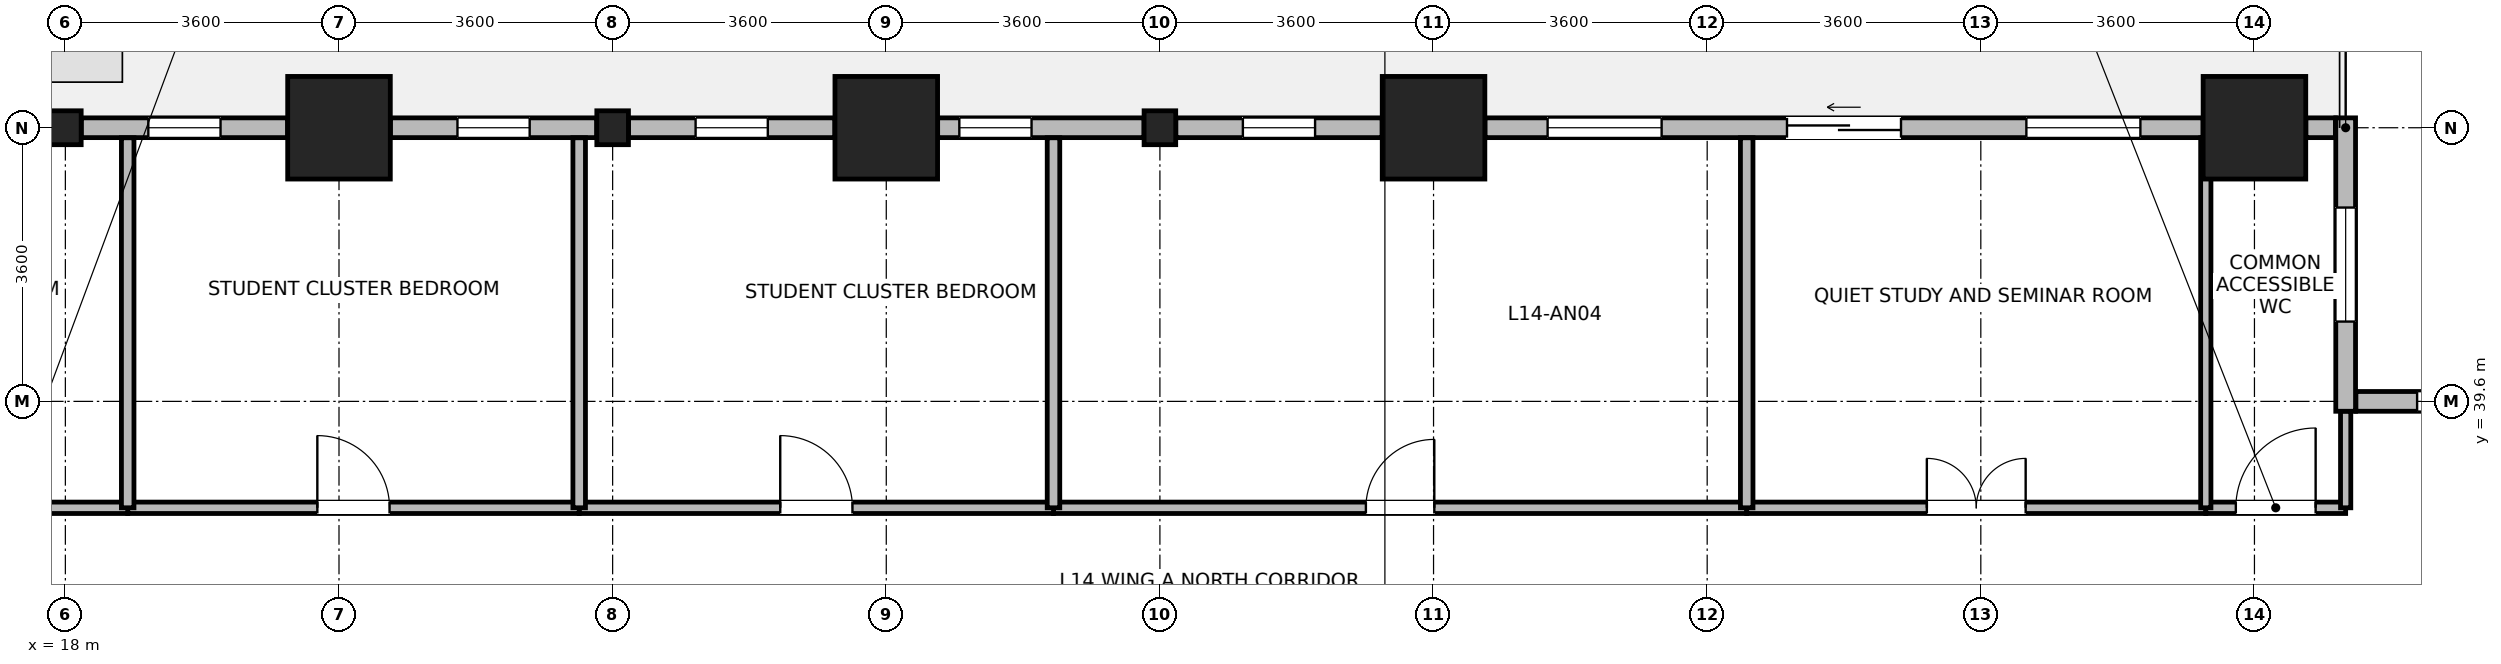
"""IFC4 building model, lengths in metres.
Left out: names, types, materials, properties, quantities, classifications, styles, units other than length and angle.
Written with IfcOpenShell. Run it as: python <this file> out.ifc"""

import sys

from ifc_helpers import new_model, si_unit, direction, frame, frame_2d, origin, origin_2d, place, context, subcontext, project, spatial, rectangle, i_section, extrude, source, transform, mapped, element, fill, save


model = new_model("IFC4")
c1 = context("Model", 3, precision=1e-05, world=origin(), true_north=direction((0.0, 1.0)))
c2 = subcontext(c1, "Body", "Model", "MODEL_VIEW")
j1 = project(units=[si_unit("LENGTHUNIT", "METRE"), si_unit("PLANEANGLEUNIT", "RADIAN")], contexts=[c1])
p1 = place(None, origin())
s1 = spatial("IfcSite", under=j1, at=p1, CompositionType="ELEMENT")
p2 = place(p1, origin())
s2 = spatial("IfcBuilding", under=s1, at=p2, CompositionType="ELEMENT")
p3 = place(p2, frame((0.0, 0.0, 58.6)))
s3 = spatial("IfcBuildingStorey", under=s2, at=p3, CompositionType="ELEMENT", Elevation=58.6)
m1 = source(origin(), c2, "Body", "SweptSolid", [
    extrude(rectangle(XDim=1.35, YDim=1.35, at=origin_2d()), origin(), (0.0, 0.0, 1.0), 3.7),
])
for number, where, z_axis, x_axis in (
    (1, (21.6, 43.2, 0.0), (0.0, 0.0, 1.0), (1.0, 0.0, 0.0)),
    (2, (28.8, 43.2, 0.0), (0.0, 0.0, 1.0), (1.0, 0.0, 0.0)),
    (3, (36.0, 43.2, 0.0), (0.0, 0.0, 1.0), (1.0, 0.0, 0.0)),
    (4, (46.8, 43.2, 0.0), (0.0, 0.0, 1.0), (1.0, 0.0, 0.0)),
):
    element("IfcColumn", number, at=place(p3, frame(where, z_axis=z_axis, x_axis=x_axis)), inside=s3, PredefinedType="COLUMN", context=c2, shape_type="MappedRepresentation", body=[
        mapped(m1, transform((0.0, 0.0, 0.0), x_axis=(1.0, 0.0, 0.0), y_axis=(0.0, 1.0, 0.0), z_axis=(0.0, 0.0, 1.0), scale=1.0)),
    ])
m2 = source(origin(), c2, "Body", "SweptSolid", [
    extrude(i_section(OverallWidth=0.416, OverallDepth=0.446, WebThickness=0.029, FlangeThickness=0.04, FilletRadius=0.015, at=origin_2d()), origin(), (0.0, 0.0, 1.0), 3.7),
])
for number, where, z_axis, x_axis in (
    (5, (18.0, 43.2, 0.0), (0.0, 0.0, 1.0), (1.0, 0.0, 0.0)),
    (6, (25.2, 43.2, 0.0), (0.0, 0.0, 1.0), (1.0, 0.0, 0.0)),
    (7, (32.4, 43.2, 0.0), (0.0, 0.0, 1.0), (1.0, 0.0, 0.0)),
):
    element("IfcColumn", number, at=place(p3, frame(where, z_axis=z_axis, x_axis=x_axis)), inside=s3, PredefinedType="COLUMN", context=c2, shape_type="MappedRepresentation", body=[
        mapped(m2, transform((0.0, 0.0, 0.0), x_axis=(1.0, 0.0, 0.0), y_axis=(0.0, 1.0, 0.0), z_axis=(0.0, 0.0, 1.0), scale=1.0)),
    ])
p4 = place(p3, frame((48.135, 39.6, 0.0), z_axis=(0.0, 0.0, 1.0), x_axis=(1.0, 0.0, 0.0)))
e8 = element("IfcWall", 8, at=p4, inside=s3, PredefinedType="STANDARD", context=c2, shape_type="SweptSolid", body=[
    extrude(rectangle(XDim=9.33, YDim=0.26, at=frame_2d((4.665, 0.0))), origin(), (0.0, 0.0, 1.0), 3.43),
])
p5 = place(p4, frame((0.805, 0.0, 0.85)))
e9 = element("IfcOpeningElement", 9, at=p5, cuts=e8, PredefinedType="OPENING", context=c2, shape_type="SweptSolid", body=[
    extrude(rectangle(XDim=1.5, YDim=1.85, at=frame_2d((0.75, 0.925))), frame((0.0, 0.14, 0.0), z_axis=(0.0, -1.0, 0.0), x_axis=(1.0, 0.0, 0.0)), (0.0, 0.0, 1.0), 0.28),
])
p6 = place(p4, frame((3.915, 0.0, 0.85)))
e10 = element("IfcOpeningElement", 10, at=p6, cuts=e8, PredefinedType="OPENING", context=c2, shape_type="SweptSolid", body=[
    extrude(rectangle(XDim=1.5, YDim=1.85, at=frame_2d((0.75, 0.925))), frame((0.0, 0.14, 0.0), z_axis=(0.0, -1.0, 0.0), x_axis=(1.0, 0.0, 0.0)), (0.0, 0.0, 1.0), 0.28),
])
p7 = place(p4, frame((7.025, 0.0, 0.85)))
e11 = element("IfcOpeningElement", 11, at=p7, cuts=e8, PredefinedType="OPENING", context=c2, shape_type="SweptSolid", body=[
    extrude(rectangle(XDim=1.5, YDim=1.85, at=frame_2d((0.75, 0.925))), frame((0.0, 0.14, 0.0), z_axis=(0.0, -1.0, 0.0), x_axis=(1.0, 0.0, 0.0)), (0.0, 0.0, 1.0), 0.28),
])
p8 = place(p3, frame((48.0, 43.33, 0.0), z_axis=(0.0, 0.0, 1.0), x_axis=(0.0, -1.0, 0.0)))
e12 = element("IfcWall", 12, at=p8, inside=s3, PredefinedType="STANDARD", context=c2, shape_type="SweptSolid", body=[
    extrude(rectangle(XDim=3.86, YDim=0.26, at=frame_2d((1.93, 0.0))), origin(), (0.0, 0.0, 1.0), 3.43),
])
p9 = place(p8, frame((1.18, 0.0, 0.85)))
e13 = element("IfcOpeningElement", 13, at=p9, cuts=e12, PredefinedType="OPENING", context=c2, shape_type="SweptSolid", body=[
    extrude(rectangle(XDim=1.5, YDim=1.85, at=frame_2d((0.75, 0.925))), frame((0.0, 0.14, 0.0), z_axis=(0.0, -1.0, 0.0), x_axis=(1.0, 0.0, 0.0)), (0.0, 0.0, 1.0), 0.28),
])
p10 = place(p3, frame((47.476, 43.2, 0.0), z_axis=(0.0, 0.0, 1.0), x_axis=(1.0, 0.0, 0.0)))
e14 = element("IfcWall", 14, at=p10, inside=s3, PredefinedType="STANDARD", context=c2, shape_type="SweptSolid", body=[
    extrude(rectangle(XDim=0.389, YDim=0.26, at=frame_2d((0.194, 0.0))), origin(), (0.0, 0.0, 1.0), 3.43),
])
p11 = place(p3, frame((36.676, 43.2, 0.0), z_axis=(0.0, 0.0, 1.0), x_axis=(1.0, 0.0, 0.0)))
e15 = element("IfcWall", 15, at=p11, inside=s3, PredefinedType="STANDARD", context=c2, shape_type="SweptSolid", body=[
    extrude(rectangle(XDim=9.448, YDim=0.26, at=frame_2d((4.724, 0.0))), origin(), (0.0, 0.0, 1.0), 2.93),
])
p12 = place(p11, frame((3.974, 0.0, 0.0)))
e16 = element("IfcOpeningElement", 16, at=p12, cuts=e15, PredefinedType="OPENING", context=c2, shape_type="SweptSolid", body=[
    extrude(rectangle(XDim=1.5, YDim=2.15, at=frame_2d((0.75, 1.075))), frame((0.0, 0.14, 0.0), z_axis=(0.0, -1.0, 0.0), x_axis=(1.0, 0.0, 0.0)), (0.0, 0.0, 1.0), 0.28),
])
p13 = place(p11, frame((0.825, 0.0, 0.85)))
e17 = element("IfcOpeningElement", 17, at=p13, cuts=e15, PredefinedType="OPENING", context=c2, shape_type="SweptSolid", body=[
    extrude(rectangle(XDim=1.5, YDim=1.85, at=frame_2d((0.75, 0.925))), frame((0.0, 0.14, 0.0), z_axis=(0.0, -1.0, 0.0), x_axis=(1.0, 0.0, 0.0)), (0.0, 0.0, 1.0), 0.28),
])
p14 = place(p11, frame((7.123, 0.0, 0.85)))
e18 = element("IfcOpeningElement", 18, at=p14, cuts=e15, PredefinedType="OPENING", context=c2, shape_type="SweptSolid", body=[
    extrude(rectangle(XDim=1.5, YDim=1.85, at=frame_2d((0.75, 0.925))), frame((0.0, 0.14, 0.0), z_axis=(0.0, -1.0, 0.0), x_axis=(1.0, 0.0, 0.0)), (0.0, 0.0, 1.0), 0.28),
])
p15 = place(p3, frame((32.609, 43.2, 0.0), z_axis=(0.0, 0.0, 1.0), x_axis=(1.0, 0.0, 0.0)))
e19 = element("IfcWall", 19, at=p15, inside=s3, PredefinedType="STANDARD", context=c2, shape_type="SweptSolid", body=[
    extrude(rectangle(XDim=2.715, YDim=0.26, at=frame_2d((1.357, 0.0))), origin(), (0.0, 0.0, 1.0), 2.93),
])
p16 = place(p15, frame((0.883, 0.0, 0.85)))
e20 = element("IfcOpeningElement", 20, at=p16, cuts=e19, PredefinedType="OPENING", context=c2, shape_type="SweptSolid", body=[
    extrude(rectangle(XDim=0.95, YDim=1.75, at=frame_2d((0.475, 0.875))), frame((0.0, 0.14, 0.0), z_axis=(0.0, -1.0, 0.0), x_axis=(1.0, 0.0, 0.0)), (0.0, 0.0, 1.0), 0.28),
])
p17 = place(p3, frame((29.476, 43.2, 0.0), z_axis=(0.0, 0.0, 1.0), x_axis=(1.0, 0.0, 0.0)))
e21 = element("IfcWall", 21, at=p17, inside=s3, PredefinedType="STANDARD", context=c2, shape_type="SweptSolid", body=[
    extrude(rectangle(XDim=2.715, YDim=0.26, at=frame_2d((1.357, 0.0))), origin(), (0.0, 0.0, 1.0), 2.93),
])
p18 = place(p17, frame((0.285, 0.0, 0.85)))
e22 = element("IfcOpeningElement", 22, at=p18, cuts=e21, PredefinedType="OPENING", context=c2, shape_type="SweptSolid", body=[
    extrude(rectangle(XDim=0.95, YDim=1.75, at=frame_2d((0.475, 0.875))), frame((0.0, 0.14, 0.0), z_axis=(0.0, -1.0, 0.0), x_axis=(1.0, 0.0, 0.0)), (0.0, 0.0, 1.0), 0.28),
])
p19 = place(p3, frame((25.409, 43.2, 0.0), z_axis=(0.0, 0.0, 1.0), x_axis=(1.0, 0.0, 0.0)))
e23 = element("IfcWall", 23, at=p19, inside=s3, PredefinedType="STANDARD", context=c2, shape_type="SweptSolid", body=[
    extrude(rectangle(XDim=2.715, YDim=0.26, at=frame_2d((1.357, 0.0))), origin(), (0.0, 0.0, 1.0), 2.93),
])
p20 = place(p19, frame((0.883, 0.0, 0.85)))
e24 = element("IfcOpeningElement", 24, at=p20, cuts=e23, PredefinedType="OPENING", context=c2, shape_type="SweptSolid", body=[
    extrude(rectangle(XDim=0.95, YDim=1.75, at=frame_2d((0.475, 0.875))), frame((0.0, 0.14, 0.0), z_axis=(0.0, -1.0, 0.0), x_axis=(1.0, 0.0, 0.0)), (0.0, 0.0, 1.0), 0.28),
])
p21 = place(p3, frame((22.276, 43.2, 0.0), z_axis=(0.0, 0.0, 1.0), x_axis=(1.0, 0.0, 0.0)))
e25 = element("IfcWall", 25, at=p21, inside=s3, PredefinedType="STANDARD", context=c2, shape_type="SweptSolid", body=[
    extrude(rectangle(XDim=2.715, YDim=0.26, at=frame_2d((1.357, 0.0))), origin(), (0.0, 0.0, 1.0), 2.93),
])
p22 = place(p21, frame((0.883, 0.0, 0.85)))
e26 = element("IfcOpeningElement", 26, at=p22, cuts=e25, PredefinedType="OPENING", context=c2, shape_type="SweptSolid", body=[
    extrude(rectangle(XDim=0.95, YDim=1.75, at=frame_2d((0.475, 0.875))), frame((0.0, 0.14, 0.0), z_axis=(0.0, -1.0, 0.0), x_axis=(1.0, 0.0, 0.0)), (0.0, 0.0, 1.0), 0.28),
])
p23 = place(p3, frame((18.209, 43.2, 0.0), z_axis=(0.0, 0.0, 1.0), x_axis=(1.0, 0.0, 0.0)))
e27 = element("IfcWall", 27, at=p23, inside=s3, PredefinedType="STANDARD", context=c2, shape_type="SweptSolid", body=[
    extrude(rectangle(XDim=2.715, YDim=0.26, at=frame_2d((1.357, 0.0))), origin(), (0.0, 0.0, 1.0), 2.93),
])
p24 = place(p23, frame((0.883, 0.0, 0.85)))
e28 = element("IfcOpeningElement", 28, at=p24, cuts=e27, PredefinedType="OPENING", context=c2, shape_type="SweptSolid", body=[
    extrude(rectangle(XDim=0.95, YDim=1.75, at=frame_2d((0.475, 0.875))), frame((0.0, 0.14, 0.0), z_axis=(0.0, -1.0, 0.0), x_axis=(1.0, 0.0, 0.0)), (0.0, 0.0, 1.0), 0.28),
])
p25 = place(p3, frame((31.0, 38.2, 0.0), z_axis=(0.0, 0.0, 1.0), x_axis=(1.0, 0.0, 0.0)))
e29 = element("IfcWall", 29, at=p25, inside=s3, PredefinedType="PARTITIONING", context=c2, shape_type="SweptSolid", body=[
    extrude(rectangle(XDim=9.12, YDim=0.15, at=frame_2d((4.56, 0.0))), origin(), (0.0, 0.0, 1.0), 3.43),
])
p26 = place(p25, frame((4.11, 0.0, 0.0)))
e30 = element("IfcOpeningElement", 30, at=p26, cuts=e29, PredefinedType="OPENING", context=c2, shape_type="SweptSolid", body=[
    extrude(rectangle(XDim=0.9, YDim=2.08, at=frame_2d((0.45, 1.04))), frame((0.0, 0.085, 0.0), z_axis=(0.0, -1.0, 0.0), x_axis=(1.0, 0.0, 0.0)), (0.0, 0.0, 1.0), 0.17),
])
p27 = place(p3, frame((24.76, 38.2, 0.0), z_axis=(0.0, 0.0, 1.0), x_axis=(1.0, 0.0, 0.0)))
e31 = element("IfcWall", 31, at=p27, inside=s3, PredefinedType="PARTITIONING", context=c2, shape_type="SweptSolid", body=[
    extrude(rectangle(XDim=6.24, YDim=0.15, at=frame_2d((3.12, 0.0))), origin(), (0.0, 0.0, 1.0), 3.43),
])
p28 = place(p27, frame((2.645, 0.0, 0.0)))
e32 = element("IfcOpeningElement", 32, at=p28, cuts=e31, PredefinedType="OPENING", context=c2, shape_type="SweptSolid", body=[
    extrude(rectangle(XDim=0.95, YDim=2.1, at=frame_2d((0.475, 1.05))), frame((0.0, 0.085, 0.0), z_axis=(0.0, -1.0, 0.0), x_axis=(1.0, 0.0, 0.0)), (0.0, 0.0, 1.0), 0.17),
])
p29 = place(p3, frame((40.12, 38.2, 0.0), z_axis=(0.0, 0.0, 1.0), x_axis=(1.0, 0.0, 0.0)))
e33 = element("IfcWall", 33, at=p29, inside=s3, PredefinedType="PARTITIONING", context=c2, shape_type="SweptSolid", body=[
    extrude(rectangle(XDim=6.04, YDim=0.15, at=frame_2d((3.02, 0.0))), origin(), (0.0, 0.0, 1.0), 3.43),
])
p30 = place(p29, frame((2.37, 0.0, 0.0)))
e34 = element("IfcOpeningElement", 34, at=p30, cuts=e33, PredefinedType="OPENING", context=c2, shape_type="SweptSolid", body=[
    extrude(rectangle(XDim=1.3, YDim=2.12, at=frame_2d((0.65, 1.06))), frame((0.0, 0.085, 0.0), z_axis=(0.0, -1.0, 0.0), x_axis=(1.0, 0.0, 0.0)), (0.0, 0.0, 1.0), 0.17),
])
p31 = place(p3, frame((18.82, 38.2, 0.0), z_axis=(0.0, 0.0, 1.0), x_axis=(1.0, 0.0, 0.0)))
e35 = element("IfcWall", 35, at=p31, inside=s3, PredefinedType="PARTITIONING", context=c2, shape_type="SweptSolid", body=[
    extrude(rectangle(XDim=5.94, YDim=0.15, at=frame_2d((2.97, 0.0))), origin(), (0.0, 0.0, 1.0), 3.43),
])
p32 = place(p31, frame((2.495, 0.0, 0.0)))
e36 = element("IfcOpeningElement", 36, at=p32, cuts=e35, PredefinedType="OPENING", context=c2, shape_type="SweptSolid", body=[
    extrude(rectangle(XDim=0.95, YDim=2.1, at=frame_2d((0.475, 1.05))), frame((0.0, 0.085, 0.0), z_axis=(0.0, -1.0, 0.0), x_axis=(1.0, 0.0, 0.0)), (0.0, 0.0, 1.0), 0.17),
])
p33 = place(p3, frame((13.2, 38.2, 0.0), z_axis=(0.0, 0.0, 1.0), x_axis=(1.0, 0.0, 0.0)))
e37 = element("IfcWall", 37, at=p33, inside=s3, PredefinedType="PARTITIONING", context=c2, shape_type="SweptSolid", body=[
    extrude(rectangle(XDim=5.62, YDim=0.15, at=frame_2d((2.81, 0.0))), origin(), (0.0, 0.0, 1.0), 3.43),
])
p34 = place(p33, frame((2.335, 0.0, 0.0)))
e38 = element("IfcOpeningElement", 38, at=p34, cuts=e37, PredefinedType="OPENING", context=c2, shape_type="SweptSolid", body=[
    extrude(rectangle(XDim=0.95, YDim=2.1, at=frame_2d((0.475, 1.05))), frame((0.0, 0.085, 0.0), z_axis=(0.0, -1.0, 0.0), x_axis=(1.0, 0.0, 0.0)), (0.0, 0.0, 1.0), 0.17),
])
p35 = place(p3, frame((46.16, 38.2, 0.0), z_axis=(0.0, 0.0, 1.0), x_axis=(1.0, 0.0, 0.0)))
e39 = element("IfcWall", 39, at=p35, inside=s3, PredefinedType="PARTITIONING", context=c2, shape_type="SweptSolid", body=[
    extrude(rectangle(XDim=1.84, YDim=0.15, at=frame_2d((0.92, 0.0))), origin(), (0.0, 0.0, 1.0), 3.43),
])
p36 = place(p35, frame((0.395, 0.0, 0.0)))
e40 = element("IfcOpeningElement", 40, at=p36, cuts=e39, PredefinedType="OPENING", context=c2, shape_type="SweptSolid", body=[
    extrude(rectangle(XDim=1.05, YDim=2.12, at=frame_2d((0.525, 1.06))), frame((0.0, 0.085, 0.0), z_axis=(0.0, -1.0, 0.0), x_axis=(1.0, 0.0, 0.0)), (0.0, 0.0, 1.0), 0.17),
])
for number, where, z_axis, x_axis in (
    (41, (18.82, 38.2, 0.0), (0.0, 0.0, 1.0), (0.0, 1.0, 0.0)),
    (42, (24.76, 38.2, 0.0), (0.0, 0.0, 1.0), (0.0, 1.0, 0.0)),
    (43, (31.0, 38.2, 0.0), (0.0, 0.0, 1.0), (0.0, 1.0, 0.0)),
    (44, (40.12, 38.2, 0.0), (0.0, 0.0, 1.0), (0.0, 1.0, 0.0)),
):
    element("IfcWall", number, at=place(p3, frame(where, z_axis=z_axis, x_axis=x_axis)), inside=s3, PredefinedType="PARTITIONING", context=c2, shape_type="SweptSolid", body=[
        extrude(rectangle(XDim=4.868, YDim=0.165, at=frame_2d((2.434, 0.0))), origin(), (0.0, 0.0, 1.0), 3.43),
    ])
p37 = place(p3, frame((46.16, 38.2, 0.0), z_axis=(0.0, 0.0, 1.0), x_axis=(0.0, 1.0, 0.0)))
e45 = element("IfcWall", 45, at=p37, inside=s3, PredefinedType="PARTITIONING", context=c2, shape_type="SweptSolid", body=[
    extrude(rectangle(XDim=4.868, YDim=0.135, at=frame_2d((2.434, 0.0))), origin(), (0.0, 0.0, 1.0), 3.43),
])
p38 = place(p3, frame((48.0, 38.2, 0.0), z_axis=(0.0, 0.0, 1.0), x_axis=(0.0, 1.0, 0.0)))
e46 = element("IfcWall", 46, at=p38, inside=s3, PredefinedType="PARTITIONING", context=c2, shape_type="SweptSolid", body=[
    extrude(rectangle(XDim=1.268, YDim=0.135, at=frame_2d((0.634, 0.0))), origin(), (0.0, 0.0, 1.0), 3.43),
])
p39 = place(p5, origin())
e47 = element("IfcWindow", 47, at=p39, inside=s3, PartitioningType="SINGLE_PANEL", PredefinedType="WINDOW", context=c2, shape_type="SweptSolid", body=[
    extrude(rectangle(XDim=1.5, YDim=1.85, at=frame_2d((0.75, 0.925))), frame((0.0, 0.03, 0.0), z_axis=(0.0, -1.0, 0.0), x_axis=(1.0, 0.0, 0.0)), (0.0, 0.0, 1.0), 0.06),
])
fill(e9, e47)
p40 = place(p9, origin())
e48 = element("IfcWindow", 48, at=p40, inside=s3, PartitioningType="SINGLE_PANEL", PredefinedType="WINDOW", context=c2, shape_type="SweptSolid", body=[
    extrude(rectangle(XDim=1.5, YDim=1.85, at=frame_2d((0.75, 0.925))), frame((0.0, 0.03, 0.0), z_axis=(0.0, -1.0, 0.0), x_axis=(1.0, 0.0, 0.0)), (0.0, 0.0, 1.0), 0.06),
])
fill(e13, e48)
p41 = place(p12, origin())
e49 = element("IfcDoor", 49, at=p41, inside=s3, OperationType="SLIDING_TO_LEFT", PredefinedType="DOOR", context=c2, shape_type="SweptSolid", body=[
    extrude(rectangle(XDim=1.5, YDim=2.15, at=frame_2d((0.75, 1.075))), frame((0.0, 0.025, 0.0), z_axis=(0.0, -1.0, 0.0), x_axis=(1.0, 0.0, 0.0)), (0.0, 0.0, 1.0), 0.05),
])
fill(e16, e49)
p42 = place(p13, origin())
e50 = element("IfcWindow", 50, at=p42, inside=s3, PartitioningType="SINGLE_PANEL", PredefinedType="WINDOW", context=c2, shape_type="SweptSolid", body=[
    extrude(rectangle(XDim=1.5, YDim=1.85, at=frame_2d((0.75, 0.925))), frame((0.0, 0.03, 0.0), z_axis=(0.0, -1.0, 0.0), x_axis=(1.0, 0.0, 0.0)), (0.0, 0.0, 1.0), 0.06),
])
fill(e17, e50)
p43 = place(p14, origin())
e51 = element("IfcWindow", 51, at=p43, inside=s3, PartitioningType="SINGLE_PANEL", PredefinedType="WINDOW", context=c2, shape_type="SweptSolid", body=[
    extrude(rectangle(XDim=1.5, YDim=1.85, at=frame_2d((0.75, 0.925))), frame((0.0, 0.03, 0.0), z_axis=(0.0, -1.0, 0.0), x_axis=(1.0, 0.0, 0.0)), (0.0, 0.0, 1.0), 0.06),
])
fill(e18, e51)
p44 = place(p16, origin())
e52 = element("IfcWindow", 52, at=p44, inside=s3, PartitioningType="SINGLE_PANEL", PredefinedType="WINDOW", context=c2, shape_type="SweptSolid", body=[
    extrude(rectangle(XDim=0.95, YDim=1.75, at=frame_2d((0.475, 0.875))), frame((0.0, 0.03, 0.0), z_axis=(0.0, -1.0, 0.0), x_axis=(1.0, 0.0, 0.0)), (0.0, 0.0, 1.0), 0.06),
])
fill(e20, e52)
p45 = place(p18, origin())
e53 = element("IfcWindow", 53, at=p45, inside=s3, PartitioningType="SINGLE_PANEL", PredefinedType="WINDOW", context=c2, shape_type="SweptSolid", body=[
    extrude(rectangle(XDim=0.95, YDim=1.75, at=frame_2d((0.475, 0.875))), frame((0.0, 0.03, 0.0), z_axis=(0.0, -1.0, 0.0), x_axis=(1.0, 0.0, 0.0)), (0.0, 0.0, 1.0), 0.06),
])
fill(e22, e53)
p46 = place(p20, origin())
e54 = element("IfcWindow", 54, at=p46, inside=s3, PartitioningType="SINGLE_PANEL", PredefinedType="WINDOW", context=c2, shape_type="SweptSolid", body=[
    extrude(rectangle(XDim=0.95, YDim=1.75, at=frame_2d((0.475, 0.875))), frame((0.0, 0.03, 0.0), z_axis=(0.0, -1.0, 0.0), x_axis=(1.0, 0.0, 0.0)), (0.0, 0.0, 1.0), 0.06),
])
fill(e24, e54)
p47 = place(p22, origin())
e55 = element("IfcWindow", 55, at=p47, inside=s3, PartitioningType="SINGLE_PANEL", PredefinedType="WINDOW", context=c2, shape_type="SweptSolid", body=[
    extrude(rectangle(XDim=0.95, YDim=1.75, at=frame_2d((0.475, 0.875))), frame((0.0, 0.03, 0.0), z_axis=(0.0, -1.0, 0.0), x_axis=(1.0, 0.0, 0.0)), (0.0, 0.0, 1.0), 0.06),
])
fill(e26, e55)
p48 = place(p24, origin())
e56 = element("IfcWindow", 56, at=p48, inside=s3, PartitioningType="SINGLE_PANEL", PredefinedType="WINDOW", context=c2, shape_type="SweptSolid", body=[
    extrude(rectangle(XDim=0.95, YDim=1.75, at=frame_2d((0.475, 0.875))), frame((0.0, 0.03, 0.0), z_axis=(0.0, -1.0, 0.0), x_axis=(1.0, 0.0, 0.0)), (0.0, 0.0, 1.0), 0.06),
])
fill(e28, e56)
p49 = place(p26, origin())
e57 = element("IfcDoor", 57, at=p49, inside=s3, OperationType="SINGLE_SWING_RIGHT", PredefinedType="DOOR", context=c2, shape_type="SweptSolid", body=[
    extrude(rectangle(XDim=0.9, YDim=2.08, at=frame_2d((0.45, 1.04))), frame((0.0, 0.025, 0.0), z_axis=(0.0, -1.0, 0.0), x_axis=(1.0, 0.0, 0.0)), (0.0, 0.0, 1.0), 0.05),
])
fill(e30, e57)
p50 = place(p28, origin())
e58 = element("IfcDoor", 58, at=p50, inside=s3, OperationType="SINGLE_SWING_LEFT", PredefinedType="DOOR", context=c2, shape_type="SweptSolid", body=[
    extrude(rectangle(XDim=0.95, YDim=2.1, at=frame_2d((0.475, 1.05))), frame((0.0, 0.025, 0.0), z_axis=(0.0, -1.0, 0.0), x_axis=(1.0, 0.0, 0.0)), (0.0, 0.0, 1.0), 0.05),
])
fill(e32, e58)
p51 = place(p30, origin())
e59 = element("IfcDoor", 59, at=p51, inside=s3, OperationType="DOUBLE_DOOR_SINGLE_SWING", PredefinedType="DOOR", context=c2, shape_type="SweptSolid", body=[
    extrude(rectangle(XDim=1.3, YDim=2.12, at=frame_2d((0.65, 1.06))), frame((0.0, 0.025, 0.0), z_axis=(0.0, -1.0, 0.0), x_axis=(1.0, 0.0, 0.0)), (0.0, 0.0, 1.0), 0.05),
])
fill(e34, e59)
p52 = place(p32, origin())
e60 = element("IfcDoor", 60, at=p52, inside=s3, OperationType="SINGLE_SWING_LEFT", PredefinedType="DOOR", context=c2, shape_type="SweptSolid", body=[
    extrude(rectangle(XDim=0.95, YDim=2.1, at=frame_2d((0.475, 1.05))), frame((0.0, 0.025, 0.0), z_axis=(0.0, -1.0, 0.0), x_axis=(1.0, 0.0, 0.0)), (0.0, 0.0, 1.0), 0.05),
])
fill(e36, e60)
p53 = place(p36, origin())
e61 = element("IfcDoor", 61, at=p53, inside=s3, OperationType="SINGLE_SWING_RIGHT", PredefinedType="DOOR", context=c2, shape_type="SweptSolid", body=[
    extrude(rectangle(XDim=1.05, YDim=2.12, at=frame_2d((0.525, 1.06))), frame((0.0, 0.025, 0.0), z_axis=(0.0, -1.0, 0.0), x_axis=(1.0, 0.0, 0.0)), (0.0, 0.0, 1.0), 0.05),
])
fill(e40, e61)
save(model, sys.argv[1])
